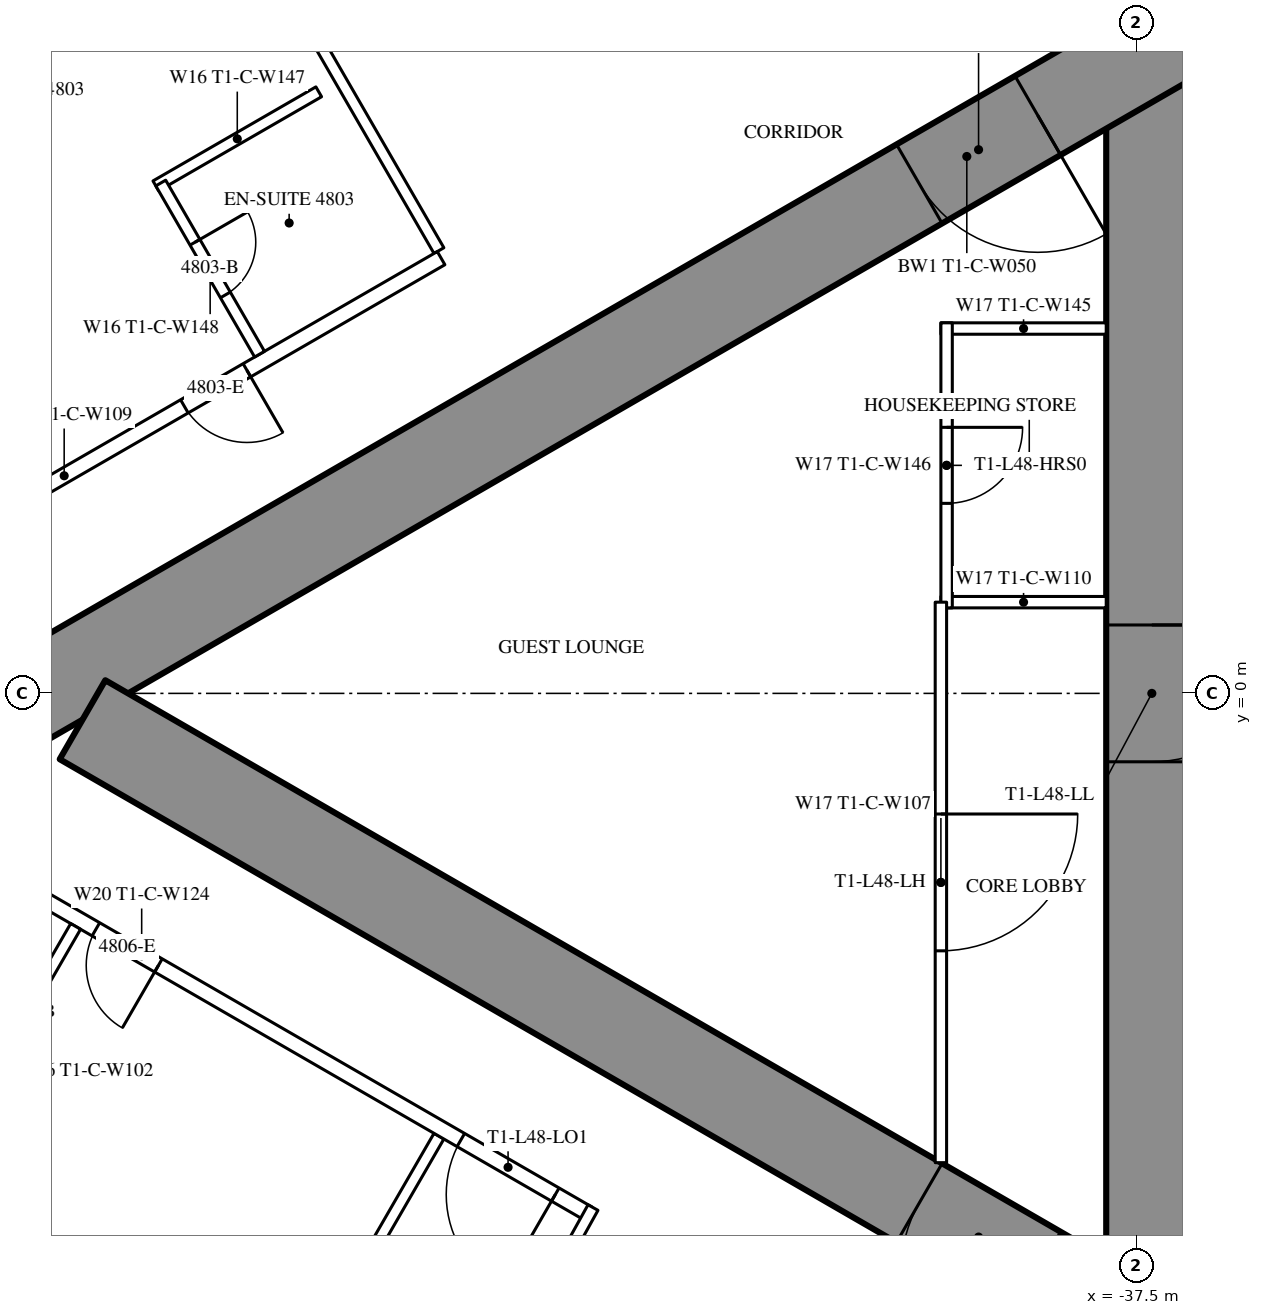
"""IFC4 building model, lengths in metres.
Left out: names, types, materials, properties, quantities, classifications, styles, units other than length and angle.
Written with IfcOpenShell. Run it as: python <this file> out.ifc"""

import sys

from ifc_helpers import new_model, si_unit, direction, frame, frame_2d, origin, place, context, subcontext, project, spatial, rectangle, extrude, element, fill, save


model = new_model("IFC4")
c1 = context("Model", 3, precision=1e-05, world=origin(), true_north=direction((0.0, 1.0)))
c2 = subcontext(c1, "Body", "Model", "MODEL_VIEW")
j1 = project(units=[si_unit("LENGTHUNIT", "METRE"), si_unit("PLANEANGLEUNIT", "RADIAN")], contexts=[c1])
p1 = place(None, origin())
s1 = spatial("IfcSite", under=j1, at=p1, CompositionType="ELEMENT")
p2 = place(p1, origin())
s2 = spatial("IfcBuilding", under=s1, at=p2, CompositionType="ELEMENT")
p3 = place(p2, frame((0.0, 0.0, 180.8)))
s3 = spatial("IfcBuildingStorey", under=s2, at=p3, CompositionType="ELEMENT", Elevation=180.8)
p4 = place(p3, frame((-37.3, 8.6, 0.0), z_axis=(0.0, 0.0, 1.0), x_axis=(0.0, -1.0, 0.0)))
e1 = element("IfcWall", 1, at=p4, inside=s3, PredefinedType="SHEAR", context=c2, shape_type="SweptSolid", body=[
    extrude(rectangle(XDim=17.2, YDim=1.2, at=frame_2d((8.6, 0.0))), origin(), (0.0, 0.0, 1.0), 3.5),
])
p5 = place(p4, frame((7.7, 0.0, 0.0)))
e2 = element("IfcOpeningElement", 2, at=p5, cuts=e1, PredefinedType="OPENING", context=c2, shape_type="SweptSolid", body=[
    extrude(rectangle(XDim=1.8, YDim=2.2, at=frame_2d((0.9, 1.1))), frame((0.0, 0.61, 0.0), z_axis=(0.0, -1.0, 0.0), x_axis=(1.0, 0.0, 0.0)), (0.0, 0.0, 1.0), 1.22),
])
p6 = place(p3, frame((-27.2, 14.3, 0.0), z_axis=(0.0, 0.0, 1.0), x_axis=(-0.866026593062, -0.499997940104, 0.0)))
e3 = element("IfcWall", 3, at=p6, inside=s3, PredefinedType="SHEAR", context=c2, shape_type="SweptSolid", body=[
    extrude(rectangle(XDim=28.946, YDim=1.2, at=frame_2d((14.473, 0.0))), origin(), (0.0, 0.0, 1.0), 3.5),
])
p7 = place(p6, frame((4.6, 0.0, 0.0)))
e4 = element("IfcOpeningElement", 4, at=p7, cuts=e3, PredefinedType="OPENING", context=c2, shape_type="SweptSolid", body=[
    extrude(rectangle(XDim=1.0, YDim=2.2, at=frame_2d((0.5, 1.1))), frame((0.0, 0.61, 0.0), z_axis=(0.0, -1.0, 0.0), x_axis=(1.0, 0.0, 0.0)), (0.0, 0.0, 1.0), 1.22),
])
p8 = place(p6, frame((13.395, 0.0, 0.0)))
e5 = element("IfcOpeningElement", 5, at=p8, cuts=e3, PredefinedType="OPENING", context=c2, shape_type="SweptSolid", body=[
    extrude(rectangle(XDim=1.8, YDim=2.2, at=frame_2d((0.9, 1.1))), frame((0.0, 0.61, 0.0), z_axis=(0.0, -1.0, 0.0), x_axis=(1.0, 0.0, 0.0)), (0.0, 0.0, 1.0), 1.22),
])
p9 = place(p3, frame((-27.2, -14.3, 0.0), z_axis=(0.0, 0.0, 1.0), x_axis=(-0.866024021859, 0.500002393557, 0.0)))
e6 = element("IfcWall", 6, at=p9, inside=s3, PredefinedType="SHEAR", context=c2, shape_type="SweptSolid", body=[
    extrude(rectangle(XDim=27.907, YDim=1.2, at=frame_2d((13.954, 0.0))), origin(), (0.0, 0.0, 1.0), 3.5),
])
p10 = place(p9, frame((4.6, 0.0, 0.0)))
e7 = element("IfcOpeningElement", 7, at=p10, cuts=e6, PredefinedType="OPENING", context=c2, shape_type="SweptSolid", body=[
    extrude(rectangle(XDim=1.0, YDim=2.2, at=frame_2d((0.5, 1.1))), frame((0.0, 0.61, 0.0), z_axis=(0.0, -1.0, 0.0), x_axis=(1.0, 0.0, 0.0)), (0.0, 0.0, 1.0), 1.22),
])
p11 = place(p9, frame((13.395, 0.0, 0.0)))
e8 = element("IfcOpeningElement", 8, at=p11, cuts=e6, PredefinedType="OPENING", context=c2, shape_type="SweptSolid", body=[
    extrude(rectangle(XDim=1.8, YDim=2.2, at=frame_2d((0.9, 1.1))), frame((0.0, 0.61, 0.0), z_axis=(0.0, -1.0, 0.0), x_axis=(1.0, 0.0, 0.0)), (0.0, 0.0, 1.0), 1.22),
])
for number, where, z_axis, x_axis in (
    (9, (-46.679, 5.825, 0.0), (0.0, 0.0, 1.0), (-0.5, 0.866, 0.0)),
    (10, (-46.679, -5.825, 0.0), (0.0, 0.0, 1.0), (-0.5, -0.866, 0.0)),
):
    element("IfcWall", number, at=place(p3, frame(where, z_axis=z_axis, x_axis=x_axis)), inside=s3, PredefinedType="PARTITIONING", context=c2, shape_type="SweptSolid", body=[
        extrude(rectangle(XDim=6.911, YDim=0.15, at=frame_2d((3.456, 0.0))), origin(), (0.0, 0.0, 1.0), 2.3),
    ])
p12 = place(p3, frame((-44.715, -6.844, 0.0), z_axis=(0.0, 0.0, 1.0), x_axis=(-0.866025261224, 0.500000246922, 0.0)))
e11 = element("IfcWall", 11, at=p12, inside=s3, PredefinedType="PARTITIONING", context=c2, shape_type="SweptSolid", body=[
    extrude(rectangle(XDim=13.567, YDim=0.2, at=frame_2d((6.783, 0.0))), origin(), (0.0, 0.0, 1.0), 3.25),
])
p13 = place(p12, frame((10.579, 0.0, 0.0)))
e12 = element("IfcOpeningElement", 12, at=p13, cuts=e11, PredefinedType="OPENING", context=c2, shape_type="SweptSolid", body=[
    extrude(rectangle(XDim=0.95, YDim=2.2, at=frame_2d((0.475, 1.1))), frame((0.0, 0.11, 0.0), z_axis=(0.0, -1.0, 0.0), x_axis=(1.0, 0.0, 0.0)), (0.0, 0.0, 1.0), 0.22),
])
p14 = place(p12, frame((6.529, 0.0, 0.0)))
e13 = element("IfcOpeningElement", 13, at=p14, cuts=e11, PredefinedType="OPENING", context=c2, shape_type="SweptSolid", body=[
    extrude(rectangle(XDim=0.95, YDim=2.2, at=frame_2d((0.475, 1.1))), frame((0.0, 0.11, 0.0), z_axis=(0.0, -1.0, 0.0), x_axis=(1.0, 0.0, 0.0)), (0.0, 0.0, 1.0), 0.22),
])
p15 = place(p12, frame((0.5, 0.0, 0.0)))
e14 = element("IfcOpeningElement", 14, at=p15, cuts=e11, PredefinedType="OPENING", context=c2, shape_type="SweptSolid", body=[
    extrude(rectangle(XDim=1.435, YDim=2.2, at=frame_2d((0.718, 1.1))), frame((0.0, 0.11, 0.0), z_axis=(0.0, -1.0, 0.0), x_axis=(1.0, 0.0, 0.0)), (0.0, 0.0, 1.0), 0.22),
])
p16 = place(p3, frame((-44.652, -6.764, 0.0), z_axis=(0.0, 0.0, 1.0), x_axis=(-0.485424724123, -0.874278466629, 0.0)))
e15 = element("IfcWall", 15, at=p16, inside=s3, PredefinedType="PARTITIONING", context=c2, shape_type="SweptSolid", body=[
    extrude(rectangle(XDim=1.805, YDim=0.15, at=frame_2d((0.903, 0.0))), origin(), (0.0, 0.0, 1.0), 3.25),
])
p17 = place(p3, frame((-46.65, 5.726, 0.0), z_axis=(0.0, 0.0, 1.0), x_axis=(-0.866027963864, -0.499995565786, 0.0)))
e16 = element("IfcWall", 16, at=p17, inside=s3, PredefinedType="PARTITIONING", context=c2, shape_type="SweptSolid", body=[
    extrude(rectangle(XDim=11.452, YDim=0.2, at=frame_2d((5.726, 0.0))), origin(), (0.0, 0.0, 1.0), 3.25),
])
p18 = place(p17, frame((2.95, 0.0, 0.0)))
e17 = element("IfcOpeningElement", 17, at=p18, cuts=e16, PredefinedType="OPENING", context=c2, shape_type="SweptSolid", body=[
    extrude(rectangle(XDim=0.95, YDim=2.2, at=frame_2d((0.475, 1.1))), frame((0.0, 0.11, 0.0), z_axis=(0.0, -1.0, 0.0), x_axis=(1.0, 0.0, 0.0)), (0.0, 0.0, 1.0), 0.22),
])
p19 = place(p17, frame((8.344, 0.0, 0.0)))
e18 = element("IfcOpeningElement", 18, at=p19, cuts=e16, PredefinedType="OPENING", context=c2, shape_type="SweptSolid", body=[
    extrude(rectangle(XDim=0.95, YDim=2.2, at=frame_2d((0.475, 1.1))), frame((0.0, 0.11, 0.0), z_axis=(0.0, -1.0, 0.0), x_axis=(1.0, 0.0, 0.0)), (0.0, 0.0, 1.0), 0.22),
])
p20 = place(p3, frame((-48.26, 7.914, 0.0), z_axis=(0.0, 0.0, 1.0), x_axis=(-0.866031185235, -0.4999899861, 0.0)))
e19 = element("IfcWall", 19, at=p20, inside=s3, PredefinedType="PARTITIONING", context=c2, shape_type="SweptSolid", body=[
    extrude(rectangle(XDim=2.475, YDim=0.15, at=frame_2d((1.238, 0.0))), origin(), (0.0, 0.0, 1.0), 3.25),
])
p21 = place(p3, frame((-49.039, 4.463, 0.0), z_axis=(0.0, 0.0, 1.0), x_axis=(-0.499936506574, 0.866062058628, 0.0)))
e20 = element("IfcWall", 20, at=p21, inside=s3, PredefinedType="PARTITIONING", context=c2, shape_type="SweptSolid", body=[
    extrude(rectangle(XDim=2.6, YDim=0.15, at=frame_2d((1.3, 0.0))), origin(), (0.0, 0.0, 1.0), 3.25),
])
p22 = place(p21, frame((0.9, 0.0, 0.0)))
e21 = element("IfcOpeningElement", 21, at=p22, cuts=e20, PredefinedType="OPENING", context=c2, shape_type="SweptSolid", body=[
    extrude(rectangle(XDim=0.8, YDim=2.2, at=frame_2d((0.4, 1.1))), frame((0.0, 0.085, 0.0), z_axis=(0.0, -1.0, 0.0), x_axis=(1.0, 0.0, 0.0)), (0.0, 0.0, 1.0), 0.17),
])
p23 = place(p3, frame((-51.459, -3.065, 0.0), z_axis=(0.0, 0.0, 1.0), x_axis=(-0.499936506574, -0.866062058628, 0.0)))
e22 = element("IfcWall", 22, at=p23, inside=s3, PredefinedType="PARTITIONING", context=c2, shape_type="SweptSolid", body=[
    extrude(rectangle(XDim=2.6, YDim=0.15, at=frame_2d((1.3, 0.0))), origin(), (0.0, 0.0, 1.0), 3.25),
])
p24 = place(p23, frame((0.9, 0.0, 0.0)))
e23 = element("IfcOpeningElement", 23, at=p24, cuts=e22, PredefinedType="OPENING", context=c2, shape_type="SweptSolid", body=[
    extrude(rectangle(XDim=0.8, YDim=2.2, at=frame_2d((0.4, 1.1))), frame((0.0, 0.085, 0.0), z_axis=(0.0, -1.0, 0.0), x_axis=(1.0, 0.0, 0.0)), (0.0, 0.0, 1.0), 0.17),
])
for number, where, z_axis, x_axis in (
    (24, (-37.9, 1.2, 0.0), (0.0, 0.0, 1.0), (-1.0, 0.0, 0.0)),
    (25, (-37.9, 4.8, 0.0), (0.0, 0.0, 1.0), (-1.0, 0.0, 0.0)),
):
    element("IfcWall", number, at=place(p3, frame(where, z_axis=z_axis, x_axis=x_axis)), inside=s3, PredefinedType="PARTITIONING", context=c2, shape_type="SweptSolid", body=[
        extrude(rectangle(XDim=2.175, YDim=0.15, at=frame_2d((1.087, 0.0))), origin(), (0.0, 0.0, 1.0), 3.25),
    ])
p25 = place(p3, frame((-40.0, 4.875, 0.0), z_axis=(0.0, 0.0, 1.0), x_axis=(0.0, -1.0, 0.0)))
e26 = element("IfcWall", 26, at=p25, inside=s3, PredefinedType="PARTITIONING", context=c2, shape_type="SweptSolid", body=[
    extrude(rectangle(XDim=3.75, YDim=0.15, at=frame_2d((1.875, 0.0))), origin(), (0.0, 0.0, 1.0), 3.25),
])
p26 = place(p25, frame((1.375, 0.0, 0.0)))
e27 = element("IfcOpeningElement", 27, at=p26, cuts=e26, PredefinedType="OPENING", context=c2, shape_type="SweptSolid", body=[
    extrude(rectangle(XDim=1.0, YDim=2.2, at=frame_2d((0.5, 1.1))), frame((0.0, 0.085, 0.0), z_axis=(0.0, -1.0, 0.0), x_axis=(1.0, 0.0, 0.0)), (0.0, 0.0, 1.0), 0.17),
])
p27 = place(p3, frame((-40.075, 1.2, 0.0), z_axis=(0.0, 0.0, 1.0), x_axis=(0.0, -1.0, 0.0)))
e28 = element("IfcWall", 28, at=p27, inside=s3, PredefinedType="PARTITIONING", context=c2, shape_type="SweptSolid", body=[
    extrude(rectangle(XDim=7.374, YDim=0.15, at=frame_2d((3.687, 0.0))), origin(), (0.0, 0.0, 1.0), 3.25),
])
p28 = place(p27, frame((2.787, 0.0, 0.0)))
e29 = element("IfcOpeningElement", 29, at=p28, cuts=e28, PredefinedType="OPENING", context=c2, shape_type="SweptSolid", body=[
    extrude(rectangle(XDim=1.8, YDim=2.2, at=frame_2d((0.9, 1.1))), frame((0.0, 0.085, 0.0), z_axis=(0.0, -1.0, 0.0), x_axis=(1.0, 0.0, 0.0)), (0.0, 0.0, 1.0), 0.17),
])
p29 = place(p22, origin())
e30 = element("IfcDoor", 30, at=p29, inside=s3, OperationType="SINGLE_SWING_RIGHT", PredefinedType="DOOR", context=c2, shape_type="SweptSolid", body=[
    extrude(rectangle(XDim=0.8, YDim=2.2, at=frame_2d((0.4, 1.1))), frame((0.0, 0.025, 0.0), z_axis=(0.0, -1.0, 0.0), x_axis=(1.0, 0.0, 0.0)), (0.0, 0.0, 1.0), 0.05),
])
fill(e21, e30)
p30 = place(p18, origin())
e31 = element("IfcDoor", 31, at=p30, inside=s3, OperationType="SINGLE_SWING_LEFT", PredefinedType="DOOR", context=c2, shape_type="SweptSolid", body=[
    extrude(rectangle(XDim=0.95, YDim=2.2, at=frame_2d((0.475, 1.1))), frame((0.0, 0.025, 0.0), z_axis=(0.0, -1.0, 0.0), x_axis=(1.0, 0.0, 0.0)), (0.0, 0.0, 1.0), 0.05),
])
fill(e17, e31)
p31 = place(p14, origin())
e32 = element("IfcDoor", 32, at=p31, inside=s3, OperationType="SINGLE_SWING_LEFT", PredefinedType="DOOR", context=c2, shape_type="SweptSolid", body=[
    extrude(rectangle(XDim=0.95, YDim=2.2, at=frame_2d((0.475, 1.1))), frame((0.0, 0.025, 0.0), z_axis=(0.0, -1.0, 0.0), x_axis=(1.0, 0.0, 0.0)), (0.0, 0.0, 1.0), 0.05),
])
fill(e13, e32)
p32 = place(p15, origin())
e33 = element("IfcDoor", 33, at=p32, inside=s3, OperationType="SINGLE_SWING_LEFT", PredefinedType="DOOR", context=c2, shape_type="SweptSolid", body=[
    extrude(rectangle(XDim=1.435, YDim=2.2, at=frame_2d((0.718, 1.1))), frame((0.0, 0.025, 0.0), z_axis=(0.0, -1.0, 0.0), x_axis=(1.0, 0.0, 0.0)), (0.0, 0.0, 1.0), 0.05),
])
fill(e14, e33)
p33 = place(p26, origin())
e34 = element("IfcDoor", 34, at=p33, inside=s3, OperationType="SINGLE_SWING_LEFT", PredefinedType="DOOR", context=c2, shape_type="SweptSolid", body=[
    extrude(rectangle(XDim=1.0, YDim=2.2, at=frame_2d((0.5, 1.1))), frame((0.0, 0.025, 0.0), z_axis=(0.0, -1.0, 0.0), x_axis=(1.0, 0.0, 0.0)), (0.0, 0.0, 1.0), 0.05),
])
fill(e27, e34)
p34 = place(p28, origin())
e35 = element("IfcDoor", 35, at=p34, inside=s3, OperationType="DOUBLE_DOOR_SINGLE_SWING", PredefinedType="DOOR", context=c2, shape_type="SweptSolid", body=[
    extrude(rectangle(XDim=1.8, YDim=2.2, at=frame_2d((0.9, 1.1))), frame((0.0, 0.025, 0.0), z_axis=(0.0, -1.0, 0.0), x_axis=(1.0, 0.0, 0.0)), (0.0, 0.0, 1.0), 0.05),
])
fill(e29, e35)
p35 = place(p8, origin())
e36 = element("IfcDoor", 36, at=p35, inside=s3, OperationType="DOUBLE_DOOR_SINGLE_SWING", PredefinedType="DOOR", context=c2, shape_type="SweptSolid", body=[
    extrude(rectangle(XDim=1.8, YDim=2.2, at=frame_2d((0.9, 1.1))), frame((0.0, 0.025, 0.0), z_axis=(0.0, -1.0, 0.0), x_axis=(1.0, 0.0, 0.0)), (0.0, 0.0, 1.0), 0.05),
])
fill(e5, e36)
p36 = place(p11, origin())
e37 = element("IfcDoor", 37, at=p36, inside=s3, OperationType="DOUBLE_DOOR_SINGLE_SWING", PredefinedType="DOOR", context=c2, shape_type="SweptSolid", body=[
    extrude(rectangle(XDim=1.8, YDim=2.2, at=frame_2d((0.9, 1.1))), frame((0.0, 0.025, 0.0), z_axis=(0.0, -1.0, 0.0), x_axis=(1.0, 0.0, 0.0)), (0.0, 0.0, 1.0), 0.05),
])
fill(e8, e37)
p37 = place(p5, origin())
e38 = element("IfcDoor", 38, at=p37, inside=s3, OperationType="DOUBLE_DOOR_SINGLE_SWING", PredefinedType="DOOR", context=c2, shape_type="SweptSolid", body=[
    extrude(rectangle(XDim=1.8, YDim=2.2, at=frame_2d((0.9, 1.1))), frame((0.0, 0.025, 0.0), z_axis=(0.0, -1.0, 0.0), x_axis=(1.0, 0.0, 0.0)), (0.0, 0.0, 1.0), 0.05),
])
fill(e2, e38)
save(model, sys.argv[1])
